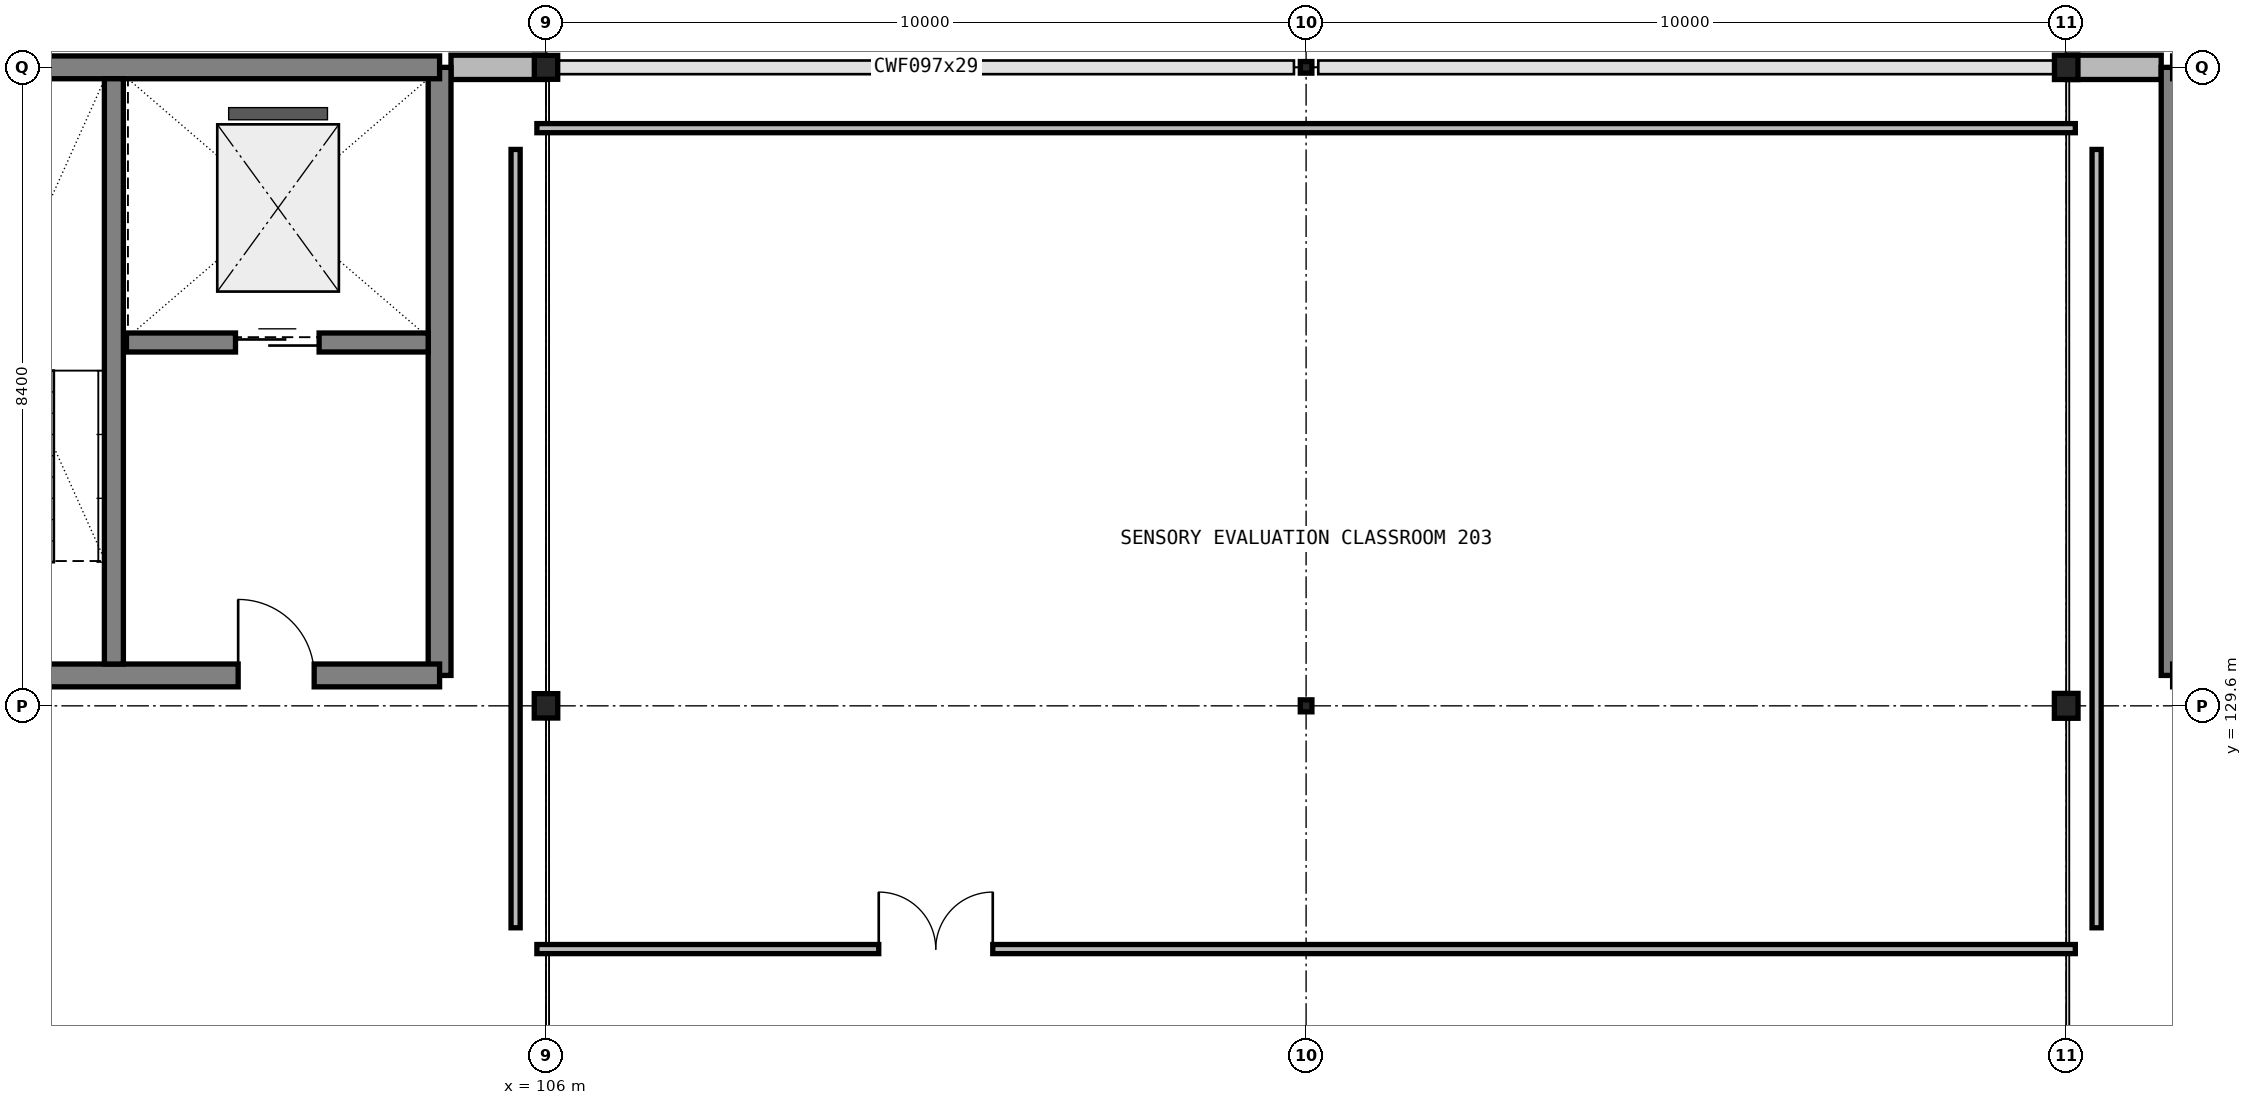
"""IFC4 building model, lengths in metres.
Left out: names, types, materials, properties, quantities, classifications, styles, units other than length and angle.
Written with IfcOpenShell. Run it as: python <this file> out.ifc"""

import sys

from ifc_helpers import new_model, si_unit, direction, frame, frame_2d, origin, origin_2d_with_axis, place, context, subcontext, project, spatial, rectangle, i_section, extrude, element, fill, save


model = new_model("IFC4")
c1 = context("Model", 3, precision=1e-05, world=origin(), true_north=direction((0.0, 1.0)))
c2 = subcontext(c1, "Body", "Model", "MODEL_VIEW")
j1 = project(units=[si_unit("LENGTHUNIT", "METRE"), si_unit("PLANEANGLEUNIT", "RADIAN")], contexts=[c1])
p1 = place(None, origin())
s1 = spatial("IfcSite", under=j1, at=p1, CompositionType="ELEMENT")
p2 = place(p1, origin())
s2 = spatial("IfcBuilding", under=s1, at=p2, CompositionType="ELEMENT")
p3 = place(p2, frame((0.0, 0.0, 8.4)))
s3 = spatial("IfcBuildingStorey", under=s2, at=p3, CompositionType="ELEMENT", Elevation=8.4)
p4 = place(p3, frame((106.0, 129.6, 0.0), z_axis=(0.0, 0.0, 1.0), x_axis=(1.0, 0.0, 0.0)))
e1 = element("IfcColumn", 1, at=p4, inside=s3, PredefinedType="COLUMN", context=c2, shape_type="SweptSolid", body=[
    extrude(i_section(OverallWidth=0.309, OverallDepth=0.321, WebThickness=0.014, FlangeThickness=0.022, FilletRadius=0.017, at=origin_2d_with_axis()), origin(), (0.0, 0.0, 1.0), 3.6),
])
p5 = place(p3, frame((106.0, 138.0, 0.0), z_axis=(0.0, 0.0, 1.0), x_axis=(1.0, 0.0, 0.0)))
e2 = element("IfcColumn", 2, at=p5, inside=s3, PredefinedType="COLUMN", context=c2, shape_type="SweptSolid", body=[
    extrude(i_section(OverallWidth=0.307, OverallDepth=0.315, WebThickness=0.012, FlangeThickness=0.019, FilletRadius=0.017, at=origin_2d_with_axis()), origin(), (0.0, 0.0, 1.0), 3.6),
])
p6 = place(p3, frame((116.0, 129.6, 0.0), z_axis=(0.0, 0.0, 1.0), x_axis=(1.0, 0.0, 0.0)))
e3 = element("IfcColumn", 3, at=p6, inside=s3, PredefinedType="COLUMN", context=c2, shape_type="SweptSolid", body=[
    extrude(i_section(OverallWidth=0.153, OverallDepth=0.158, WebThickness=0.007, FlangeThickness=0.01, FilletRadius=0.009, at=origin_2d_with_axis()), origin(), (0.0, 0.0, 1.0), 3.6),
])
p7 = place(p3, frame((116.0, 138.0, 0.0), z_axis=(0.0, 0.0, 1.0), x_axis=(1.0, 0.0, 0.0)))
e4 = element("IfcColumn", 4, at=p7, inside=s3, PredefinedType="COLUMN", context=c2, shape_type="SweptSolid", body=[
    extrude(i_section(OverallWidth=0.152, OverallDepth=0.152, WebThickness=0.006, FlangeThickness=0.007, FilletRadius=0.009, at=origin_2d_with_axis()), origin(), (0.0, 0.0, 1.0), 3.6),
])
p8 = place(p3, frame((126.0, 129.6, 0.0), z_axis=(0.0, 0.0, 1.0), x_axis=(1.0, 0.0, 0.0)))
e5 = element("IfcColumn", 5, at=p8, inside=s3, PredefinedType="COLUMN", context=c2, shape_type="SweptSolid", body=[
    extrude(i_section(OverallWidth=0.311, OverallDepth=0.327, WebThickness=0.016, FlangeThickness=0.025, FilletRadius=0.017, at=origin_2d_with_axis()), origin(), (0.0, 0.0, 1.0), 3.6),
])
p9 = place(p3, frame((126.0, 138.0, 0.0), z_axis=(0.0, 0.0, 1.0), x_axis=(1.0, 0.0, 0.0)))
e6 = element("IfcColumn", 6, at=p9, inside=s3, PredefinedType="COLUMN", context=c2, shape_type="SweptSolid", body=[
    extrude(i_section(OverallWidth=0.309, OverallDepth=0.321, WebThickness=0.014, FlangeThickness=0.022, FilletRadius=0.017, at=origin_2d_with_axis()), origin(), (0.0, 0.0, 1.0), 3.6),
])
p10 = place(p3, frame((105.99, 138.0, 0.0), z_axis=(0.0, 0.0, 1.0), x_axis=(-1.0, 0.0, 0.0)))
e7 = element("IfcWall", 7, at=p10, inside=s3, PredefinedType="SOLIDWALL", context=c2, shape_type="SweptSolid", body=[
    extrude(rectangle(XDim=1.24, YDim=0.32, at=frame_2d((0.62, 0.0), x_axis=(1.0, 0.0))), origin(), (0.0, 0.0, 1.0), 2.92),
])
p11 = place(p3, frame((127.25, 138.0, 0.0), z_axis=(0.0, 0.0, 1.0), x_axis=(-1.0, 0.0, 0.0)))
e8 = element("IfcWall", 8, at=p11, inside=s3, PredefinedType="SOLIDWALL", context=c2, shape_type="SweptSolid", body=[
    extrude(rectangle(XDim=1.239, YDim=0.32, at=frame_2d((0.62, 0.0), x_axis=(1.0, 0.0))), origin(), (0.0, 0.0, 1.0), 2.92),
])
p12 = place(p3, frame((104.6, 130.0, 0.0), z_axis=(0.0, 0.0, 1.0), x_axis=(0.0, 1.0, 0.0)))
e9 = element("IfcWall", 9, at=p12, inside=s3, PredefinedType="SHEAR", context=c2, shape_type="SweptSolid", body=[
    extrude(rectangle(XDim=8.0, YDim=0.3, at=frame_2d((4.0, 0.0), x_axis=(1.0, 0.0))), origin(), (0.0, 0.0, 1.0), 3.6),
])
p13 = place(p3, frame((97.2, 130.0, 0.0), z_axis=(0.0, 0.0, 1.0), x_axis=(1.0, 0.0, 0.0)))
e10 = element("IfcWall", 10, at=p13, inside=s3, PredefinedType="SHEAR", context=c2, shape_type="SweptSolid", body=[
    extrude(rectangle(XDim=7.4, YDim=0.3, at=frame_2d((3.7, 0.0), x_axis=(1.0, 0.0))), origin(), (0.0, 0.0, 1.0), 3.6),
])
p14 = place(p13, frame((1.1, 0.0, 0.0)))
e11 = element("IfcOpeningElement", 11, at=p14, cuts=e10, PredefinedType="OPENING", context=c2, shape_type="SweptSolid", body=[
    extrude(rectangle(XDim=1.0, YDim=2.15, at=frame_2d((0.5, 1.075), x_axis=(1.0, 0.0))), frame((0.0, 0.16, 0.0), z_axis=(0.0, -1.0, 0.0), x_axis=(1.0, 0.0, 0.0)), (0.0, 0.0, 1.0), 0.32),
])
p15 = place(p13, frame((4.75, 0.0, 0.0)))
e12 = element("IfcOpeningElement", 12, at=p15, cuts=e10, PredefinedType="OPENING", context=c2, shape_type="SweptSolid", body=[
    extrude(rectangle(XDim=1.0, YDim=2.15, at=frame_2d((0.5, 1.075), x_axis=(1.0, 0.0))), frame((0.0, 0.16, 0.0), z_axis=(0.0, -1.0, 0.0), x_axis=(1.0, 0.0, 0.0)), (0.0, 0.0, 1.0), 0.32),
])
p16 = place(p3, frame((104.6, 138.0, 0.0), z_axis=(0.0, 0.0, 1.0), x_axis=(-1.0, 0.0, 0.0)))
e13 = element("IfcWall", 13, at=p16, inside=s3, PredefinedType="SHEAR", context=c2, shape_type="SweptSolid", body=[
    extrude(rectangle(XDim=7.4, YDim=0.3, at=frame_2d((3.7, 0.0), x_axis=(1.0, 0.0))), origin(), (0.0, 0.0, 1.0), 3.6),
])
p17 = place(p3, frame((100.315, 130.15, 0.0), z_axis=(0.0, 0.0, 1.0), x_axis=(0.0, 1.0, 0.0)))
e14 = element("IfcWall", 14, at=p17, inside=s3, PredefinedType="SHEAR", context=c2, shape_type="SweptSolid", body=[
    extrude(rectangle(XDim=7.7, YDim=0.25, at=frame_2d((3.85, 0.0), x_axis=(1.0, 0.0))), origin(), (0.0, 0.0, 1.0), 3.6),
])
p18 = place(p3, frame((100.48, 134.38, 0.0), z_axis=(0.0, 0.0, 1.0), x_axis=(1.0, 0.0, 0.0)))
e15 = element("IfcWall", 15, at=p18, inside=s3, PredefinedType="SHEAR", context=c2, shape_type="SweptSolid", body=[
    extrude(rectangle(XDim=3.97, YDim=0.25, at=frame_2d((1.985, 0.0), x_axis=(1.0, 0.0))), origin(), (0.0, 0.0, 1.0), 3.36),
])
p19 = place(p18, frame((1.435, 0.0, 0.0)))
e16 = element("IfcOpeningElement", 16, at=p19, cuts=e15, PredefinedType="OPENING", context=c2, shape_type="SweptSolid", body=[
    extrude(rectangle(XDim=1.1, YDim=2.15, at=frame_2d((0.55, 1.075), x_axis=(1.0, 0.0))), frame((0.0, 0.135, 0.0), z_axis=(0.0, -1.0, 0.0), x_axis=(1.0, 0.0, 0.0)), (0.0, 0.0, 1.0), 0.27),
])
p20 = place(p3, frame((127.4, 138.0, 0.0), z_axis=(0.0, 0.0, 1.0), x_axis=(0.0, -1.0, 0.0)))
e17 = element("IfcWall", 17, at=p20, inside=s3, PredefinedType="SHEAR", context=c2, shape_type="SweptSolid", body=[
    extrude(rectangle(XDim=8.0, YDim=0.3, at=frame_2d((4.0, 0.0), x_axis=(1.0, 0.0))), origin(), (0.0, 0.0, 1.0), 3.6),
])
p21 = place(p3, frame((134.8, 138.0, 0.0), z_axis=(0.0, 0.0, 1.0), x_axis=(-1.0, 0.0, 0.0)))
e18 = element("IfcWall", 18, at=p21, inside=s3, PredefinedType="SHEAR", context=c2, shape_type="SweptSolid", body=[
    extrude(rectangle(XDim=7.4, YDim=0.3, at=frame_2d((3.7, 0.0), x_axis=(1.0, 0.0))), origin(), (0.0, 0.0, 1.0), 3.6),
])
p22 = place(p3, frame((105.88, 126.4, 0.0), z_axis=(0.0, 0.0, 1.0), x_axis=(1.0, 0.0, 0.0)))
e19 = element("IfcWall", 19, at=p22, inside=s3, PredefinedType="PARTITIONING", context=c2, shape_type="SweptSolid", body=[
    extrude(rectangle(XDim=20.24, YDim=0.12, at=frame_2d((10.12, 0.0), x_axis=(1.0, 0.0))), origin(), (0.0, 0.0, 1.0), 2.74),
])
p23 = place(p22, frame((4.498, 0.0, 0.0)))
e20 = element("IfcOpeningElement", 20, at=p23, cuts=e19, PredefinedType="OPENING", context=c2, shape_type="SweptSolid", body=[
    extrude(rectangle(XDim=1.5, YDim=2.25, at=frame_2d((0.75, 1.125), x_axis=(1.0, 0.0))), frame((0.0, 0.07, 0.0), z_axis=(0.0, -1.0, 0.0), x_axis=(1.0, 0.0, 0.0)), (0.0, 0.0, 1.0), 0.14),
])
p24 = place(p3, frame((126.4, 126.68, 0.0), z_axis=(0.0, 0.0, 1.0), x_axis=(0.0, 1.0, 0.0)))
e21 = element("IfcWall", 21, at=p24, inside=s3, PredefinedType="PARTITIONING", context=c2, shape_type="SweptSolid", body=[
    extrude(rectangle(XDim=10.24, YDim=0.12, at=frame_2d((5.12, 0.0), x_axis=(1.0, 0.0))), origin(), (0.0, 0.0, 1.0), 2.74),
])
p25 = place(p3, frame((126.12, 137.2, 0.0), z_axis=(0.0, 0.0, 1.0), x_axis=(-1.0, 0.0, 0.0)))
e22 = element("IfcWall", 22, at=p25, inside=s3, PredefinedType="PARTITIONING", context=c2, shape_type="SweptSolid", body=[
    extrude(rectangle(XDim=20.24, YDim=0.12, at=frame_2d((10.12, 0.0), x_axis=(1.0, 0.0))), origin(), (0.0, 0.0, 1.0), 2.74),
])
p26 = place(p3, frame((105.6, 136.92, 0.0), z_axis=(0.0, 0.0, 1.0), x_axis=(0.0, -1.0, 0.0)))
e23 = element("IfcWall", 23, at=p26, inside=s3, PredefinedType="PARTITIONING", context=c2, shape_type="SweptSolid", body=[
    extrude(rectangle(XDim=10.24, YDim=0.12, at=frame_2d((5.12, 0.0), x_axis=(1.0, 0.0))), origin(), (0.0, 0.0, 1.0), 2.74),
])
p27 = place(p15, origin())
e24 = element("IfcDoor", 24, at=p27, inside=s3, OperationType="SINGLE_SWING_LEFT", PredefinedType="DOOR", context=c2, shape_type="SweptSolid", body=[
    extrude(rectangle(XDim=1.0, YDim=2.15, at=frame_2d((0.5, 1.075), x_axis=(1.0, 0.0))), frame((0.0, 0.025, 0.0), z_axis=(0.0, -1.0, 0.0), x_axis=(1.0, 0.0, 0.0)), (0.0, 0.0, 1.0), 0.05),
])
fill(e12, e24)
p28 = place(p19, origin())
e25 = element("IfcDoor", 25, at=p28, inside=s3, OperationType="SLIDING_TO_LEFT", PredefinedType="DOOR", context=c2, shape_type="SweptSolid", body=[
    extrude(rectangle(XDim=1.1, YDim=2.15, at=frame_2d((0.55, 1.075), x_axis=(1.0, 0.0))), frame((0.0, 0.025, 0.0), z_axis=(0.0, -1.0, 0.0), x_axis=(1.0, 0.0, 0.0)), (0.0, 0.0, 1.0), 0.05),
])
fill(e16, e25)
p29 = place(p23, origin())
e26 = element("IfcDoor", 26, at=p29, inside=s3, OperationType="DOUBLE_SWING_LEFT", PredefinedType="DOOR", context=c2, shape_type="SweptSolid", body=[
    extrude(rectangle(XDim=1.5, YDim=2.25, at=frame_2d((0.75, 1.125), x_axis=(1.0, 0.0))), frame((0.0, 0.025, 0.0), z_axis=(0.0, -1.0, 0.0), x_axis=(1.0, 0.0, 0.0)), (0.0, 0.0, 1.0), 0.05),
])
fill(e20, e26)
save(model, sys.argv[1])
